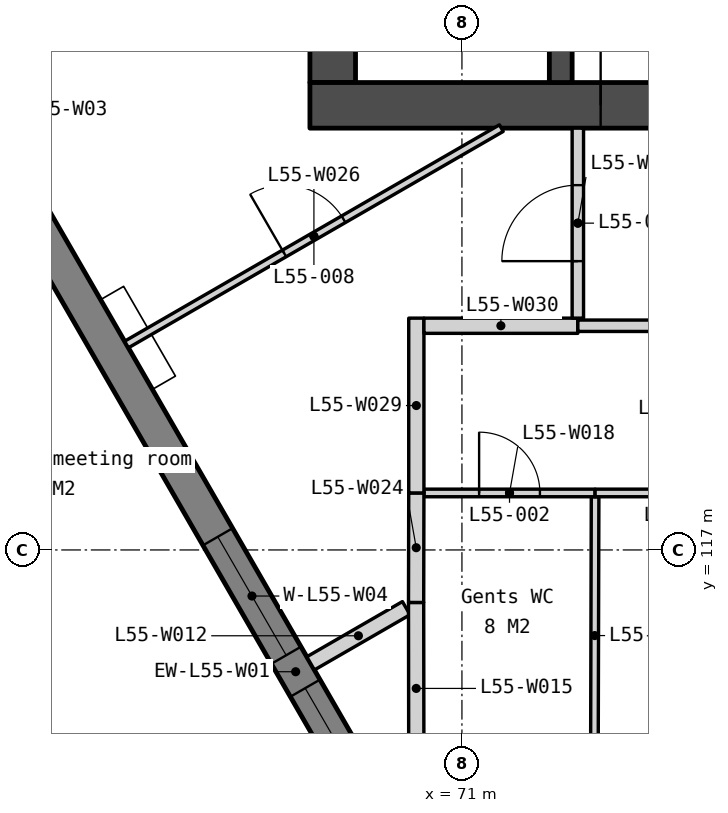
"""IFC4 building model, lengths in metres.
Left out: names, types, materials, properties, quantities, classifications, styles, units other than length and angle.
Written with IfcOpenShell. Run it as: python <this file> out.ifc"""

import sys

from ifc_helpers import new_model, si_unit, direction, frame, frame_2d, origin, place, context, subcontext, project, spatial, polyline, rectangle, outline, extrude, element, fill, save


model = new_model("IFC4")
c1 = context("Model", 3, precision=1e-05, world=origin(), true_north=direction((0.0, 1.0)))
c2 = subcontext(c1, "Body", "Model", "MODEL_VIEW")
j1 = project(units=[si_unit("LENGTHUNIT", "METRE"), si_unit("PLANEANGLEUNIT", "RADIAN")], contexts=[c1])
p1 = place(None, origin())
s1 = spatial("IfcSite", under=j1, at=p1, CompositionType="ELEMENT")
p2 = place(p1, origin())
s2 = spatial("IfcBuilding", under=s1, at=p2, CompositionType="ELEMENT")
p3 = place(p2, frame((0.0, 0.0, 219.2)))
s3 = spatial("IfcBuildingStorey", under=s2, at=p3, CompositionType="ELEMENT", Elevation=219.2)
p4 = place(p3, frame((69.3, 133.95, 0.0), z_axis=(0.0, 0.0, 1.0), x_axis=(0.0, -1.0, 0.0)))
e1 = element("IfcWall", 1, at=p4, inside=s3, PredefinedType="SOLIDWALL", context=c2, shape_type="SweptSolid", body=[
    extrude(rectangle(XDim=10.8, YDim=0.6, at=frame_2d((5.4, 0.0))), origin(), (0.0, 0.0, 1.0), 3.75),
])
p5 = place(p3, frame((69.0, 122.85, 0.0), z_axis=(0.0, 0.0, 1.0), x_axis=(1.0, 0.0, 0.0)))
e2 = element("IfcWall", 2, at=p5, inside=s3, PredefinedType="SOLIDWALL", context=c2, shape_type="SweptSolid", body=[
    extrude(rectangle(XDim=22.0, YDim=0.6, at=frame_2d((11.0, 0.0))), origin(), (0.0, 0.0, 1.0), 3.75),
])
p6 = place(p5, frame((16.375, 0.0, 0.0)))
e3 = element("IfcOpeningElement", 3, at=p6, cuts=e2, PredefinedType="OPENING", context=c2, shape_type="SweptSolid", body=[
    extrude(rectangle(XDim=1.8, YDim=2.1, at=frame_2d((0.9, 1.05))), frame((0.0, 0.31, 0.0), z_axis=(0.0, -1.0, 0.0), x_axis=(1.0, 0.0, 0.0)), (0.0, 0.0, 1.0), 0.62),
])
p7 = place(p5, frame((3.825, 0.0, 0.0)))
e4 = element("IfcOpeningElement", 4, at=p7, cuts=e2, PredefinedType="OPENING", context=c2, shape_type="SweptSolid", body=[
    extrude(rectangle(XDim=1.8, YDim=2.1, at=frame_2d((0.9, 1.05))), frame((0.0, 0.31, 0.0), z_axis=(0.0, -1.0, 0.0), x_axis=(1.0, 0.0, 0.0)), (0.0, 0.0, 1.0), 0.62),
])
p8 = place(p5, frame((12.85, 0.0, 0.0)))
e5 = element("IfcOpeningElement", 5, at=p8, cuts=e2, PredefinedType="OPENING", context=c2, shape_type="SweptSolid", body=[
    extrude(rectangle(XDim=1.5, YDim=2.1, at=frame_2d((0.75, 1.05))), frame((0.0, 0.31, 0.0), z_axis=(0.0, -1.0, 0.0), x_axis=(1.0, 0.0, 0.0)), (0.0, 0.0, 1.0), 0.62),
])
p9 = place(p3, frame((72.3, 133.95, 0.0), z_axis=(0.0, 0.0, 1.0), x_axis=(0.0, -1.0, 0.0)))
e6 = element("IfcWall", 6, at=p9, inside=s3, PredefinedType="SOLIDWALL", context=c2, shape_type="SweptSolid", body=[
    extrude(rectangle(XDim=10.8, YDim=0.3, at=frame_2d((5.4, 0.0))), origin(), (0.0, 0.0, 1.0), 3.75),
])
p10 = place(p9, frame((6.95, 0.0, 0.0)))
e7 = element("IfcOpeningElement", 7, at=p10, cuts=e6, PredefinedType="OPENING", context=c2, shape_type="SweptSolid", body=[
    extrude(rectangle(XDim=1.1, YDim=2.1, at=frame_2d((0.55, 1.05))), frame((0.0, 0.16, 0.0), z_axis=(0.0, -1.0, 0.0), x_axis=(1.0, 0.0, 0.0)), (0.0, 0.0, 1.0), 0.32),
])
p11 = place(p9, frame((9.35, 0.0, 0.0)))
e8 = element("IfcOpeningElement", 8, at=p11, cuts=e6, PredefinedType="OPENING", context=c2, shape_type="SweptSolid", body=[
    extrude(rectangle(XDim=0.9, YDim=2.1, at=frame_2d((0.45, 1.05))), frame((0.0, 0.16, 0.0), z_axis=(0.0, -1.0, 0.0), x_axis=(1.0, 0.0, 0.0)), (0.0, 0.0, 1.0), 0.32),
])
p12 = place(p9, frame((5.1, 0.0, 0.0)))
e9 = element("IfcOpeningElement", 9, at=p12, cuts=e6, PredefinedType="OPENING", context=c2, shape_type="SweptSolid", body=[
    extrude(rectangle(XDim=1.0, YDim=2.1, at=frame_2d((0.5, 1.05))), frame((0.0, 0.16, 0.0), z_axis=(0.0, -1.0, 0.0), x_axis=(1.0, 0.0, 0.0)), (0.0, 0.0, 1.0), 0.32),
])
p13 = place(p3, frame((59.13, 132.168, -0.15), z_axis=(0.0, 0.0, 1.0), x_axis=(0.500002199942, -0.866024133644, 0.0)))
e10 = element("IfcWall", 10, at=p13, inside=s3, PredefinedType="SOLIDWALL", context=c2, shape_type="SweptSolid", body=[
    extrude(outline(polyline([(38.729, 0.0), (38.729, 3.9), (0.0, 3.9), (0.0, 0.0), (38.729, 0.0)])), frame((0.0, 0.225, 0.0), z_axis=(0.0, -1.0, 0.0), x_axis=(1.0, 0.0, 0.0)), (0.0, 0.0, 1.0), 0.45),
])
p14 = place(p13, frame((0.807, 0.0, 0.95)))
e11 = element("IfcOpeningElement", 11, at=p14, cuts=e10, PredefinedType="OPENING", context=c2, shape_type="SweptSolid", body=[
    extrude(rectangle(XDim=1.2, YDim=2.2, at=frame_2d((0.6, 1.1))), frame((0.0, 0.235, 0.0), z_axis=(0.0, -1.0, 0.0), x_axis=(1.0, 0.0, 0.0)), (0.0, 0.0, 1.0), 0.47),
])
p15 = place(p13, frame((7.632, 0.0, 0.95)))
e12 = element("IfcOpeningElement", 12, at=p15, cuts=e10, PredefinedType="OPENING", context=c2, shape_type="SweptSolid", body=[
    extrude(rectangle(XDim=1.8, YDim=2.2, at=frame_2d((0.9, 1.1))), frame((0.0, 0.235, 0.0), z_axis=(0.0, -1.0, 0.0), x_axis=(1.0, 0.0, 0.0)), (0.0, 0.0, 1.0), 0.47),
])
p16 = place(p13, frame((9.932, 0.0, 0.95)))
e13 = element("IfcOpeningElement", 13, at=p16, cuts=e10, PredefinedType="OPENING", context=c2, shape_type="SweptSolid", body=[
    extrude(rectangle(XDim=1.8, YDim=2.2, at=frame_2d((0.9, 1.1))), frame((0.0, 0.235, 0.0), z_axis=(0.0, -1.0, 0.0), x_axis=(1.0, 0.0, 0.0)), (0.0, 0.0, 1.0), 0.47),
])
p17 = place(p13, frame((17.315, 0.0, 0.95)))
e14 = element("IfcOpeningElement", 14, at=p17, cuts=e10, PredefinedType="OPENING", context=c2, shape_type="SweptSolid", body=[
    extrude(rectangle(XDim=1.8, YDim=2.2, at=frame_2d((0.9, 1.1))), frame((0.0, 0.235, 0.0), z_axis=(0.0, -1.0, 0.0), x_axis=(1.0, 0.0, 0.0)), (0.0, 0.0, 1.0), 0.47),
])
p18 = place(p13, frame((19.615, 0.0, 0.95)))
e15 = element("IfcOpeningElement", 15, at=p18, cuts=e10, PredefinedType="OPENING", context=c2, shape_type="SweptSolid", body=[
    extrude(rectangle(XDim=1.8, YDim=2.2, at=frame_2d((0.9, 1.1))), frame((0.0, 0.235, 0.0), z_axis=(0.0, -1.0, 0.0), x_axis=(1.0, 0.0, 0.0)), (0.0, 0.0, 1.0), 0.47),
])
p19 = place(p13, frame((26.997, 0.0, 0.95)))
e16 = element("IfcOpeningElement", 16, at=p19, cuts=e10, PredefinedType="OPENING", context=c2, shape_type="SweptSolid", body=[
    extrude(rectangle(XDim=1.8, YDim=2.2, at=frame_2d((0.9, 1.1))), frame((0.0, 0.235, 0.0), z_axis=(0.0, -1.0, 0.0), x_axis=(1.0, 0.0, 0.0)), (0.0, 0.0, 1.0), 0.47),
])
p20 = place(p13, frame((29.297, 0.0, 0.95)))
e17 = element("IfcOpeningElement", 17, at=p20, cuts=e10, PredefinedType="OPENING", context=c2, shape_type="SweptSolid", body=[
    extrude(rectangle(XDim=1.8, YDim=2.2, at=frame_2d((0.9, 1.1))), frame((0.0, 0.235, 0.0), z_axis=(0.0, -1.0, 0.0), x_axis=(1.0, 0.0, 0.0)), (0.0, 0.0, 1.0), 0.47),
])
p21 = place(p13, frame((36.722, 0.0, 0.95)))
e18 = element("IfcOpeningElement", 18, at=p21, cuts=e10, PredefinedType="OPENING", context=c2, shape_type="SweptSolid", body=[
    extrude(rectangle(XDim=1.2, YDim=2.2, at=frame_2d((0.6, 1.1))), frame((0.0, 0.235, 0.0), z_axis=(0.0, -1.0, 0.0), x_axis=(1.0, 0.0, 0.0)), (0.0, 0.0, 1.0), 0.47),
])
p22 = place(p3, frame((69.009, 115.508, 0.0), z_axis=(0.0, 0.0, 1.0), x_axis=(0.865958882005, 0.500115201406, 0.0)))
e19 = element("IfcWall", 19, at=p22, inside=s3, PredefinedType="PARTITIONING", context=c2, shape_type="SweptSolid", body=[
    extrude(rectangle(XDim=1.453, YDim=0.2, at=frame_2d((0.727, 0.0))), origin(), (0.0, 0.0, 1.0), 3.75),
])
p23 = place(p3, frame((70.4, 114.047, 0.0), z_axis=(0.0, 0.0, 1.0), x_axis=(-0.001295195892, 0.999999161233, 0.0)))
e20 = element("IfcWall", 20, at=p23, inside=s3, PredefinedType="PARTITIONING", context=c2, shape_type="SweptSolid", body=[
    extrude(rectangle(XDim=2.262, YDim=0.2, at=frame_2d((1.131, 0.0))), origin(), (0.0, 0.0, 1.0), 3.75),
])
p24 = place(p3, frame((72.742, 114.047, 0.0), z_axis=(0.0, 0.0, 1.0), x_axis=(0.002673429826, 0.99999642638, 0.0)))
e21 = element("IfcWall", 21, at=p24, inside=s3, PredefinedType="PARTITIONING", context=c2, shape_type="SweptSolid", body=[
    extrude(rectangle(XDim=3.653, YDim=0.1, at=frame_2d((1.826, 0.0))), origin(), (0.0, 0.0, 1.0), 3.75),
])
p25 = place(p3, frame((70.5, 117.75, 0.0), z_axis=(0.0, 0.0, 1.0), x_axis=(1.0, 0.0, 0.0)))
e22 = element("IfcWall", 22, at=p25, inside=s3, PredefinedType="PARTITIONING", context=c2, shape_type="SweptSolid", body=[
    extrude(rectangle(XDim=2.252, YDim=0.1, at=frame_2d((1.126, 0.0))), origin(), (0.0, 0.0, 1.0), 3.75),
])
p26 = place(p25, frame((0.726, 0.0, 0.0)))
e23 = element("IfcOpeningElement", 23, at=p26, cuts=e22, PredefinedType="OPENING", context=c2, shape_type="SweptSolid", body=[
    extrude(rectangle(XDim=0.8, YDim=2.1, at=frame_2d((0.4, 1.05))), frame((0.0, 0.06, 0.0), z_axis=(0.0, -1.0, 0.0), x_axis=(1.0, 0.0, 0.0)), (0.0, 0.0, 1.0), 0.12),
])
p27 = place(p3, frame((72.752, 117.75, 0.0), z_axis=(0.0, 0.0, 1.0), x_axis=(1.0, 0.0, 0.0)))
e24 = element("IfcWall", 24, at=p27, inside=s3, PredefinedType="PARTITIONING", context=c2, shape_type="SweptSolid", body=[
    extrude(rectangle(XDim=2.352, YDim=0.1, at=frame_2d((1.176, 0.0))), origin(), (0.0, 0.0, 1.0), 3.75),
])
p28 = place(p27, frame((0.776, 0.0, 0.0)))
e25 = element("IfcOpeningElement", 25, at=p28, cuts=e24, PredefinedType="OPENING", context=c2, shape_type="SweptSolid", body=[
    extrude(rectangle(XDim=0.8, YDim=2.1, at=frame_2d((0.4, 1.05))), frame((0.0, 0.06, 0.0), z_axis=(0.0, -1.0, 0.0), x_axis=(1.0, 0.0, 0.0)), (0.0, 0.0, 1.0), 0.12),
])
p29 = place(p3, frame((70.397, 116.309, 0.0), z_axis=(0.0, 0.0, 1.0), x_axis=(0.002033204879, 0.999997933037, 0.0)))
e26 = element("IfcWall", 26, at=p29, inside=s3, PredefinedType="PARTITIONING", context=c2, shape_type="SweptSolid", body=[
    extrude(rectangle(XDim=1.441, YDim=0.2, at=frame_2d((0.72, 0.0))), origin(), (0.0, 0.0, 1.0), 3.75),
])
p30 = place(p3, frame((66.587, 119.703, 0.0), z_axis=(0.0, 0.0, 1.0), x_axis=(0.866023511746, 0.500003277092, 0.0)))
e27 = element("IfcWall", 27, at=p30, inside=s3, PredefinedType="PARTITIONING", context=c2, shape_type="SweptSolid", body=[
    extrude(rectangle(XDim=5.694, YDim=0.1, at=frame_2d((2.847, 0.0))), origin(), (0.0, 0.0, 1.0), 3.75),
])
p31 = place(p30, frame((2.397, 0.0, 0.0)))
e28 = element("IfcOpeningElement", 28, at=p31, cuts=e27, PredefinedType="OPENING", context=c2, shape_type="SweptSolid", body=[
    extrude(rectangle(XDim=0.9, YDim=2.1, at=frame_2d((0.45, 1.05))), frame((0.0, 0.06, 0.0), z_axis=(0.0, -1.0, 0.0), x_axis=(1.0, 0.0, 0.0)), (0.0, 0.0, 1.0), 0.12),
])
p32 = place(p3, frame((70.4, 117.75, 0.0), z_axis=(0.0, 0.0, 1.0), x_axis=(0.0, 1.0, 0.0)))
e29 = element("IfcWall", 29, at=p32, inside=s3, PredefinedType="PARTITIONING", context=c2, shape_type="SweptSolid", body=[
    extrude(rectangle(XDim=2.3, YDim=0.2, at=frame_2d((1.15, 0.0))), origin(), (0.0, 0.0, 1.0), 3.75),
])
p33 = place(p3, frame((70.5, 119.95, 0.0), z_axis=(0.0, 0.0, 1.0), x_axis=(1.0, 0.0, 0.0)))
e30 = element("IfcWall", 30, at=p33, inside=s3, PredefinedType="PARTITIONING", context=c2, shape_type="SweptSolid", body=[
    extrude(rectangle(XDim=2.025, YDim=0.2, at=frame_2d((1.012, 0.0))), origin(), (0.0, 0.0, 1.0), 3.75),
])
p34 = place(p3, frame((72.525, 120.05, 0.0), z_axis=(0.0, 0.0, 1.0), x_axis=(0.0, 1.0, 0.0)))
e31 = element("IfcWall", 31, at=p34, inside=s3, PredefinedType="PARTITIONING", context=c2, shape_type="SweptSolid", body=[
    extrude(rectangle(XDim=2.5, YDim=0.15, at=frame_2d((1.25, 0.0))), origin(), (0.0, 0.0, 1.0), 3.75),
])
p35 = place(p34, frame((0.75, 0.0, 0.0)))
e32 = element("IfcOpeningElement", 32, at=p35, cuts=e31, PredefinedType="OPENING", context=c2, shape_type="SweptSolid", body=[
    extrude(rectangle(XDim=1.0, YDim=2.1, at=frame_2d((0.5, 1.05))), frame((0.0, 0.085, 0.0), z_axis=(0.0, -1.0, 0.0), x_axis=(1.0, 0.0, 0.0)), (0.0, 0.0, 1.0), 0.17),
])
p36 = place(p3, frame((72.525, 119.95, 0.0), z_axis=(0.0, 0.0, 1.0), x_axis=(0.999999950384, -0.000315010222, 0.0)))
e33 = element("IfcWall", 33, at=p36, inside=s3, PredefinedType="PARTITIONING", context=c2, shape_type="SweptSolid", body=[
    extrude(rectangle(XDim=6.2, YDim=0.15, at=frame_2d((3.1, 0.0))), origin(), (0.0, 0.0, 1.0), 3.75),
])
p37 = place(p36, frame((2.6, 0.0, 0.0)))
e34 = element("IfcOpeningElement", 34, at=p37, cuts=e33, PredefinedType="OPENING", context=c2, shape_type="SweptSolid", body=[
    extrude(rectangle(XDim=1.0, YDim=2.1, at=frame_2d((0.5, 1.05))), frame((0.0, 0.085, 0.0), z_axis=(0.0, -1.0, 0.0), x_axis=(1.0, 0.0, 0.0)), (0.0, 0.0, 1.0), 0.17),
])
p38 = place(p7, origin())
e35 = element("IfcDoor", 35, at=p38, inside=s3, OperationType="DOUBLE_DOOR_DOUBLE_SWING", PredefinedType="DOOR", context=c2, shape_type="SweptSolid", body=[
    extrude(rectangle(XDim=1.8, YDim=2.1, at=frame_2d((0.9, 1.05))), frame((0.0, 0.025, 0.0), z_axis=(0.0, -1.0, 0.0), x_axis=(1.0, 0.0, 0.0)), (0.0, 0.0, 1.0), 0.05),
])
fill(e4, e35)
p39 = place(p17, origin())
e36 = element("IfcWindow", 36, at=p39, inside=s3, PartitioningType="SINGLE_PANEL", PredefinedType="WINDOW", context=c2, shape_type="SweptSolid", body=[
    extrude(rectangle(XDim=1.8, YDim=2.2, at=frame_2d((0.9, 1.1))), frame((0.0, 0.03, 0.0), z_axis=(0.0, -1.0, 0.0), x_axis=(1.0, 0.0, 0.0)), (0.0, 0.0, 1.0), 0.06),
])
fill(e14, e36)
p40 = place(p18, origin())
e37 = element("IfcWindow", 37, at=p40, inside=s3, PartitioningType="SINGLE_PANEL", PredefinedType="WINDOW", context=c2, shape_type="SweptSolid", body=[
    extrude(rectangle(XDim=1.8, YDim=2.2, at=frame_2d((0.9, 1.1))), frame((0.0, 0.03, 0.0), z_axis=(0.0, -1.0, 0.0), x_axis=(1.0, 0.0, 0.0)), (0.0, 0.0, 1.0), 0.06),
])
fill(e15, e37)
p41 = place(p26, origin())
e38 = element("IfcDoor", 38, at=p41, inside=s3, OperationType="SINGLE_SWING_LEFT", PredefinedType="DOOR", context=c2, shape_type="SweptSolid", body=[
    extrude(rectangle(XDim=0.8, YDim=2.1, at=frame_2d((0.4, 1.05))), frame((0.0, 0.025, 0.0), z_axis=(0.0, -1.0, 0.0), x_axis=(1.0, 0.0, 0.0)), (0.0, 0.0, 1.0), 0.05),
])
fill(e23, e38)
p42 = place(p31, origin())
e39 = element("IfcDoor", 39, at=p42, inside=s3, OperationType="SINGLE_SWING_LEFT", PredefinedType="DOOR", context=c2, shape_type="SweptSolid", body=[
    extrude(rectangle(XDim=0.9, YDim=2.1, at=frame_2d((0.45, 1.05))), frame((0.0, 0.025, 0.0), z_axis=(0.0, -1.0, 0.0), x_axis=(1.0, 0.0, 0.0)), (0.0, 0.0, 1.0), 0.05),
])
fill(e28, e39)
p43 = place(p35, origin())
e40 = element("IfcDoor", 40, at=p43, inside=s3, OperationType="SINGLE_SWING_LEFT", PredefinedType="DOOR", context=c2, shape_type="SweptSolid", body=[
    extrude(rectangle(XDim=1.0, YDim=2.1, at=frame_2d((0.5, 1.05))), frame((0.0, 0.025, 0.0), z_axis=(0.0, -1.0, 0.0), x_axis=(1.0, 0.0, 0.0)), (0.0, 0.0, 1.0), 0.05),
])
fill(e32, e40)
save(model, sys.argv[1])
